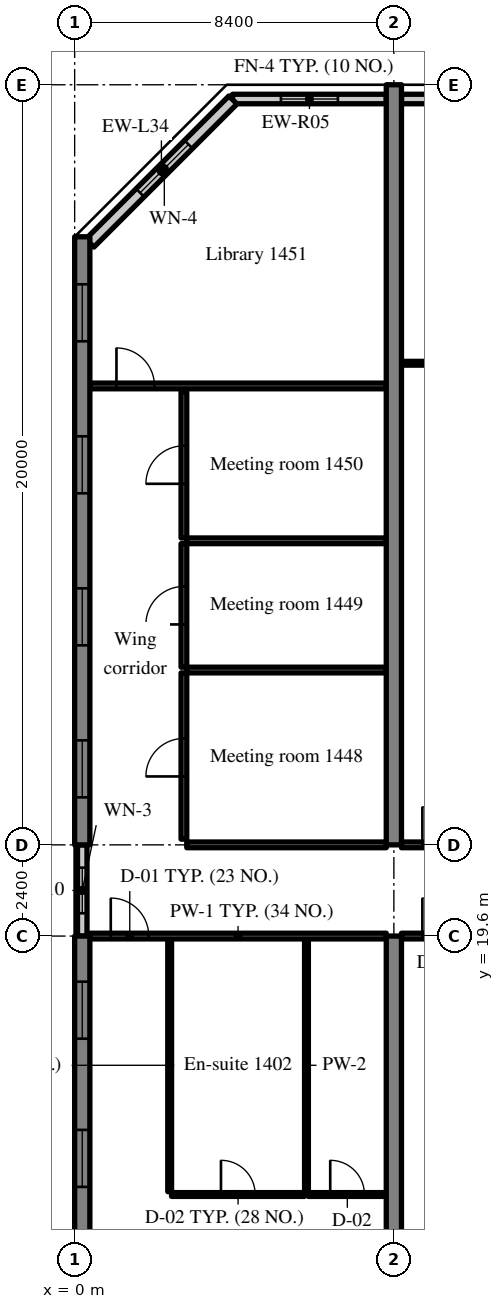
"""IFC4 building model, lengths in metres.
Left out: names, types, materials, properties, quantities, classifications, styles, units other than length and angle.
Written with IfcOpenShell. Run it as: python <this file> out.ifc"""

import sys

from ifc_helpers import new_model, si_unit, direction, frame, frame_2d, origin, place, context, subcontext, project, spatial, rectangle, extrude, source, transform, mapped, element, fill, save


model = new_model("IFC4")
c1 = context("Model", 3, precision=1e-05, world=origin(), true_north=direction((0.0, 1.0)))
c2 = subcontext(c1, "Body", "Model", "MODEL_VIEW")
j1 = project(units=[si_unit("LENGTHUNIT", "METRE"), si_unit("PLANEANGLEUNIT", "RADIAN")], contexts=[c1])
p1 = place(None, origin())
s1 = spatial("IfcSite", under=j1, at=p1, CompositionType="ELEMENT")
p2 = place(p1, origin())
s2 = spatial("IfcBuilding", under=s1, at=p2, CompositionType="ELEMENT")
p3 = place(p2, frame((0.0, 0.0, 62.0)))
s3 = spatial("IfcBuildingStorey", under=s2, at=p3, CompositionType="ELEMENT", Elevation=62.0)
m1 = source(origin(), c2, "Body", "SweptSolid", [
    extrude(rectangle(XDim=15.6, YDim=0.4, at=frame_2d((7.8, 0.0))), origin(), (0.0, 0.0, 1.0), 3.52),
])
p4 = place(p3, frame((0.2, 4.0, 0.0), z_axis=(0.0, 0.0, 1.0), x_axis=(0.0, 1.0, 0.0)))
e1 = element("IfcWall", 1, at=p4, inside=s3, PredefinedType="SHEAR", context=c2, shape_type="MappedRepresentation", body=[
    mapped(m1, transform((0.0, 0.0, 0.0), scale=1.0)),
])
m2 = source(origin(), c2, "Body", "SweptSolid", [
    extrude(rectangle(XDim=1.5, YDim=1.5, at=frame_2d((0.75, 0.75))), frame((0.0, 0.21, 0.0), z_axis=(0.0, -1.0, 0.0), x_axis=(1.0, 0.0, 0.0)), (0.0, 0.0, 1.0), 0.42),
])
p5 = place(p4, frame((1.2, 0.0, 0.9)))
e2 = element("IfcOpeningElement", 2, at=p5, cuts=e1, PredefinedType="OPENING", context=c2, shape_type="MappedRepresentation", body=[
    mapped(m2, transform((0.0, 0.0, 0.0), scale=1.0)),
])
p6 = place(p4, frame((5.1, 0.0, 0.9)))
e3 = element("IfcOpeningElement", 3, at=p6, cuts=e1, PredefinedType="OPENING", context=c2, shape_type="MappedRepresentation", body=[
    mapped(m2, transform((0.0, 0.0, 0.0), scale=1.0)),
])
p7 = place(p4, frame((9.0, 0.0, 0.9)))
e4 = element("IfcOpeningElement", 4, at=p7, cuts=e1, PredefinedType="OPENING", context=c2, shape_type="MappedRepresentation", body=[
    mapped(m2, transform((0.0, 0.0, 0.0), scale=1.0)),
])
p8 = place(p4, frame((12.9, 0.0, 0.9)))
e5 = element("IfcOpeningElement", 5, at=p8, cuts=e1, PredefinedType="OPENING", context=c2, shape_type="MappedRepresentation", body=[
    mapped(m2, transform((0.0, 0.0, 0.0), scale=1.0)),
])
m3 = source(origin(), c2, "Body", "SweptSolid", [
    extrude(rectangle(XDim=16.0, YDim=0.4, at=frame_2d((8.0, 0.0))), origin(), (0.0, 0.0, 1.0), 3.52),
])
p9 = place(p3, frame((0.2, 22.0, 0.0), z_axis=(0.0, 0.0, 1.0), x_axis=(0.0, 1.0, 0.0)))
e6 = element("IfcWall", 6, at=p9, inside=s3, PredefinedType="SHEAR", context=c2, shape_type="MappedRepresentation", body=[
    mapped(m3, transform((0.0, 0.0, 0.0), scale=1.0)),
])
p10 = place(p9, frame((1.25, 0.0, 0.9)))
e7 = element("IfcOpeningElement", 7, at=p10, cuts=e6, PredefinedType="OPENING", context=c2, shape_type="MappedRepresentation", body=[
    mapped(m2, transform((0.0, 0.0, 0.0), scale=1.0)),
])
p11 = place(p9, frame((5.25, 0.0, 0.9)))
e8 = element("IfcOpeningElement", 8, at=p11, cuts=e6, PredefinedType="OPENING", context=c2, shape_type="MappedRepresentation", body=[
    mapped(m2, transform((0.0, 0.0, 0.0), scale=1.0)),
])
p12 = place(p9, frame((9.25, 0.0, 0.9)))
e9 = element("IfcOpeningElement", 9, at=p12, cuts=e6, PredefinedType="OPENING", context=c2, shape_type="MappedRepresentation", body=[
    mapped(m2, transform((0.0, 0.0, 0.0), scale=1.0)),
])
p13 = place(p9, frame((13.25, 0.0, 0.9)))
e10 = element("IfcOpeningElement", 10, at=p13, cuts=e6, PredefinedType="OPENING", context=c2, shape_type="MappedRepresentation", body=[
    mapped(m2, transform((0.0, 0.0, 0.0), scale=1.0)),
])
m4 = source(origin(), c2, "Body", "SweptSolid", [
    extrude(rectangle(XDim=19.6, YDim=0.4, at=frame_2d((9.8, 0.0))), origin(), (0.0, 0.0, 1.0), 3.52),
])
p14 = place(p3, frame((8.4, 0.0, 0.0), z_axis=(0.0, 0.0, 1.0), x_axis=(0.0, 1.0, 0.0)))
e11 = element("IfcWall", 11, at=p14, inside=s3, PredefinedType="SHEAR", context=c2, shape_type="MappedRepresentation", body=[
    mapped(m4, transform((0.0, 0.0, 0.0), scale=1.0)),
])
m5 = source(origin(), c2, "Body", "SweptSolid", [
    extrude(rectangle(XDim=20.0, YDim=0.4, at=frame_2d((10.0, 0.0))), origin(), (0.0, 0.0, 1.0), 3.52),
])
p15 = place(p3, frame((8.4, 22.0, 0.0), z_axis=(0.0, 0.0, 1.0), x_axis=(0.0, 1.0, 0.0)))
e12 = element("IfcWall", 12, at=p15, inside=s3, PredefinedType="SHEAR", context=c2, shape_type="MappedRepresentation", body=[
    mapped(m5, transform((0.0, 0.0, 0.0), scale=1.0)),
])
m6 = source(origin(), c2, "Body", "SweptSolid", [
    extrude(rectangle(XDim=4.045, YDim=0.25, at=frame_2d((2.022, 0.0))), origin(), (0.0, 0.0, 1.0), 2.82),
])
p16 = place(p3, frame((8.2, 41.625, 0.0), z_axis=(0.0, 0.0, 1.0), x_axis=(-1.0, 0.0, 0.0)))
e13 = element("IfcWall", 13, at=p16, inside=s3, PredefinedType="SOLIDWALL", context=c2, shape_type="MappedRepresentation", body=[
    mapped(m6, transform((0.0, 0.0, 0.0), scale=1.0)),
])
m7 = source(origin(), c2, "Body", "SweptSolid", [
    extrude(rectangle(XDim=1.5, YDim=1.5, at=frame_2d((0.75, 0.75))), frame((0.0, 0.135, 0.0), z_axis=(0.0, -1.0, 0.0), x_axis=(1.0, 0.0, 0.0)), (0.0, 0.0, 1.0), 0.27),
])
p17 = place(p16, frame((1.272, 0.0, 0.9)))
e14 = element("IfcOpeningElement", 14, at=p17, cuts=e13, PredefinedType="OPENING", context=c2, shape_type="MappedRepresentation", body=[
    mapped(m7, transform((0.0, 0.0, 0.0), scale=1.0)),
])
m8 = source(origin(), c2, "Body", "SweptSolid", [
    extrude(rectangle(XDim=3.6, YDim=0.25, at=frame_2d((1.8, 0.0))), origin(), (0.0, 0.0, 1.0), 2.82),
])
p18 = place(p3, frame((12.2, 41.625, 0.0), z_axis=(0.0, 0.0, 1.0), x_axis=(-1.0, 0.0, 0.0)))
e15 = element("IfcWall", 15, at=p18, inside=s3, PredefinedType="SOLIDWALL", context=c2, shape_type="MappedRepresentation", body=[
    mapped(m8, transform((0.0, 0.0, 0.0), scale=1.0)),
])
p19 = place(p18, frame((1.05, 0.0, 0.9)))
e16 = element("IfcOpeningElement", 16, at=p19, cuts=e15, PredefinedType="OPENING", context=c2, shape_type="MappedRepresentation", body=[
    mapped(m7, transform((0.0, 0.0, 0.0), scale=1.0)),
])
m9 = source(origin(), c2, "Body", "SweptSolid", [
    extrude(rectangle(XDim=5.326, YDim=0.3, at=frame_2d((2.663, 0.0))), origin(), (0.0, 0.0, 1.0), 3.52),
])
p20 = place(p3, frame((4.166, 41.6, 0.0), z_axis=(0.0, 0.0, 1.0), x_axis=(-0.707106781187, -0.707106781187, 0.0)))
e17 = element("IfcWall", 17, at=p20, inside=s3, PredefinedType="SOLIDWALL", context=c2, shape_type="MappedRepresentation", body=[
    mapped(m9, transform((0.0, 0.0, 0.0), scale=1.0)),
])
m10 = source(origin(), c2, "Body", "SweptSolid", [
    extrude(rectangle(XDim=1.8, YDim=1.5, at=frame_2d((0.9, 0.75))), frame((0.0, 0.16, 0.0), z_axis=(0.0, -1.0, 0.0), x_axis=(1.0, 0.0, 0.0)), (0.0, 0.0, 1.0), 0.32),
])
p21 = place(p20, frame((1.654, 0.0, 0.9)))
e18 = element("IfcOpeningElement", 18, at=p21, cuts=e17, PredefinedType="OPENING", context=c2, shape_type="MappedRepresentation", body=[
    mapped(m10, transform((0.0, 0.0, 0.0), scale=1.0)),
])
m11 = source(origin(), c2, "Body", "SweptSolid", [
    extrude(rectangle(XDim=2.4, YDim=0.25, at=frame_2d((1.2, 0.0))), origin(), (0.0, 0.0, 1.0), 2.62),
])
p22 = place(p3, frame((0.2, 19.6, 0.0), z_axis=(0.0, 0.0, 1.0), x_axis=(0.0, 1.0, 0.0)))
e19 = element("IfcWall", 19, at=p22, inside=s3, PredefinedType="SOLIDWALL", context=c2, shape_type="MappedRepresentation", body=[
    mapped(m11, transform((0.0, 0.0, 0.0), scale=1.0)),
])
m12 = source(origin(), c2, "Body", "SweptSolid", [
    extrude(rectangle(XDim=1.2, YDim=1.5, at=frame_2d((0.6, 0.75))), frame((0.0, 0.135, 0.0), z_axis=(0.0, -1.0, 0.0), x_axis=(1.0, 0.0, 0.0)), (0.0, 0.0, 1.0), 0.27),
])
p23 = place(p22, frame((0.6, 0.0, 0.9)))
e20 = element("IfcOpeningElement", 20, at=p23, cuts=e19, PredefinedType="OPENING", context=c2, shape_type="MappedRepresentation", body=[
    mapped(m12, transform((0.0, 0.0, 0.0), scale=1.0)),
])
m13 = source(origin(), c2, "Body", "SweptSolid", [
    extrude(rectangle(XDim=6.65, YDim=0.1, at=frame_2d((3.325, 0.0))), origin(), (0.0, 0.0, 1.0), 3.52),
])
for number, where, z_axis, x_axis in (
    (21, (2.5, 12.875, 0.0), (0.0, 0.0, 1.0), (0.0, 1.0, 0.0)),
    (22, (6.1, 12.875, 0.0), (0.0, 0.0, 1.0), (0.0, 1.0, 0.0)),
):
    element("IfcWall", number, at=place(p3, frame(where, z_axis=z_axis, x_axis=x_axis)), inside=s3, PredefinedType="PARTITIONING", context=c2, shape_type="MappedRepresentation", body=[
        mapped(m13, transform((0.0, 0.0, 0.0), scale=1.0)),
    ])
m14 = source(origin(), c2, "Body", "SweptSolid", [
    extrude(rectangle(XDim=3.5, YDim=0.1, at=frame_2d((1.75, 0.0))), origin(), (0.0, 0.0, 1.0), 3.52),
])
p24 = place(p3, frame((2.55, 12.8, 0.0), z_axis=(0.0, 0.0, 1.0), x_axis=(1.0, 0.0, 0.0)))
e23 = element("IfcWall", 23, at=p24, inside=s3, PredefinedType="PARTITIONING", context=c2, shape_type="MappedRepresentation", body=[
    mapped(m14, transform((0.0, 0.0, 0.0), scale=1.0)),
])
m15 = source(origin(), c2, "Body", "SweptSolid", [
    extrude(rectangle(XDim=0.9, YDim=2.1, at=frame_2d((0.45, 1.05))), frame((0.0, 0.06, 0.0), z_axis=(0.0, -1.0, 0.0), x_axis=(1.0, 0.0, 0.0)), (0.0, 0.0, 1.0), 0.12),
])
p25 = place(p24, frame((1.3, 0.0, 0.0)))
e24 = element("IfcOpeningElement", 24, at=p25, cuts=e23, PredefinedType="OPENING", context=c2, shape_type="MappedRepresentation", body=[
    mapped(m15, transform((0.0, 0.0, 0.0), scale=1.0)),
])
m16 = source(origin(), c2, "Body", "SweptSolid", [
    extrude(rectangle(XDim=2.05, YDim=0.1, at=frame_2d((1.025, 0.0))), origin(), (0.0, 0.0, 1.0), 3.52),
])
p26 = place(p3, frame((6.15, 12.8, 0.0), z_axis=(0.0, 0.0, 1.0), x_axis=(1.0, 0.0, 0.0)))
e25 = element("IfcWall", 25, at=p26, inside=s3, PredefinedType="PARTITIONING", context=c2, shape_type="MappedRepresentation", body=[
    mapped(m16, transform((0.0, 0.0, 0.0), scale=1.0)),
])
p27 = place(p26, frame((0.575, 0.0, 0.0)))
e26 = element("IfcOpeningElement", 26, at=p27, cuts=e25, PredefinedType="OPENING", context=c2, shape_type="MappedRepresentation", body=[
    mapped(m15, transform((0.0, 0.0, 0.0), scale=1.0)),
])
m17 = source(origin(), c2, "Body", "SweptSolid", [
    extrude(rectangle(XDim=7.8, YDim=0.15, at=frame_2d((3.9, 0.0))), origin(), (0.0, 0.0, 1.0), 2.82),
])
p28 = place(p3, frame((0.4, 19.6, 0.0), z_axis=(0.0, 0.0, 1.0), x_axis=(1.0, 0.0, 0.0)))
e27 = element("IfcWall", 27, at=p28, inside=s3, PredefinedType="PARTITIONING", context=c2, shape_type="MappedRepresentation", body=[
    mapped(m17, transform((0.0, 0.0, 0.0), scale=1.0)),
])
m18 = source(origin(), c2, "Body", "SweptSolid", [
    extrude(rectangle(XDim=1.0, YDim=2.1, at=frame_2d((0.5, 1.05))), frame((0.0, 0.085, 0.0), z_axis=(0.0, -1.0, 0.0), x_axis=(1.0, 0.0, 0.0)), (0.0, 0.0, 1.0), 0.17),
])
p29 = place(p28, frame((0.55, 0.0, 0.0)))
e28 = element("IfcOpeningElement", 28, at=p29, cuts=e27, PredefinedType="OPENING", context=c2, shape_type="MappedRepresentation", body=[
    mapped(m18, transform((0.0, 0.0, 0.0), scale=1.0)),
])
m19 = source(origin(), c2, "Body", "SweptSolid", [
    extrude(rectangle(XDim=8.0, YDim=0.15, at=frame_2d((4.0, 0.0))), origin(), (0.0, 0.0, 1.0), 2.82),
])
p30 = place(p3, frame((8.6, 19.6, 0.0), z_axis=(0.0, 0.0, 1.0), x_axis=(1.0, 0.0, 0.0)))
e29 = element("IfcWall", 29, at=p30, inside=s3, PredefinedType="PARTITIONING", context=c2, shape_type="MappedRepresentation", body=[
    mapped(m19, transform((0.0, 0.0, 0.0), scale=1.0)),
])
p31 = place(p30, frame((0.55, 0.0, 0.0)))
e30 = element("IfcOpeningElement", 30, at=p31, cuts=e29, PredefinedType="OPENING", context=c2, shape_type="MappedRepresentation", body=[
    mapped(m18, transform((0.0, 0.0, 0.0), scale=1.0)),
])
m20 = source(origin(), c2, "Body", "SweptSolid", [
    extrude(rectangle(XDim=5.25, YDim=0.15, at=frame_2d((2.625, 0.0))), origin(), (0.0, 0.0, 1.0), 2.82),
])
p32 = place(p3, frame((2.95, 22.0, 0.0), z_axis=(0.0, 0.0, 1.0), x_axis=(1.0, 0.0, 0.0)))
e31 = element("IfcWall", 31, at=p32, inside=s3, PredefinedType="PARTITIONING", context=c2, shape_type="MappedRepresentation", body=[
    mapped(m20, transform((0.0, 0.0, 0.0), scale=1.0)),
])
m21 = source(origin(), c2, "Body", "SweptSolid", [
    extrude(rectangle(XDim=4.375, YDim=0.15, at=frame_2d((2.188, 0.0))), origin(), (0.0, 0.0, 1.0), 3.52),
])
p33 = place(p3, frame((2.875, 22.15, 0.0), z_axis=(0.0, 0.0, 1.0), x_axis=(0.0, 1.0, 0.0)))
e32 = element("IfcWall", 32, at=p33, inside=s3, PredefinedType="PARTITIONING", context=c2, shape_type="MappedRepresentation", body=[
    mapped(m21, transform((0.0, 0.0, 0.0), scale=1.0)),
])
p34 = place(p33, frame((1.65, 0.0, 0.0)))
e33 = element("IfcOpeningElement", 33, at=p34, cuts=e32, PredefinedType="OPENING", context=c2, shape_type="MappedRepresentation", body=[
    mapped(m18, transform((0.0, 0.0, 0.0), scale=1.0)),
])
m22 = source(origin(), c2, "Body", "SweptSolid", [
    extrude(rectangle(XDim=5.25, YDim=0.15, at=frame_2d((2.625, 0.0))), origin(), (0.0, 0.0, 1.0), 3.52),
])
p35 = place(p3, frame((2.95, 26.6, 0.0), z_axis=(0.0, 0.0, 1.0), x_axis=(1.0, 0.0, 0.0)))
e34 = element("IfcWall", 34, at=p35, inside=s3, PredefinedType="PARTITIONING", context=c2, shape_type="MappedRepresentation", body=[
    mapped(m22, transform((0.0, 0.0, 0.0), scale=1.0)),
])
m23 = source(origin(), c2, "Body", "SweptSolid", [
    extrude(rectangle(XDim=3.25, YDim=0.15, at=frame_2d((1.625, 0.0))), origin(), (0.0, 0.0, 1.0), 3.52),
])
p36 = place(p3, frame((2.875, 26.675, 0.0), z_axis=(0.0, 0.0, 1.0), x_axis=(0.0, 1.0, 0.0)))
e35 = element("IfcWall", 35, at=p36, inside=s3, PredefinedType="PARTITIONING", context=c2, shape_type="MappedRepresentation", body=[
    mapped(m23, transform((0.0, 0.0, 0.0), scale=1.0)),
])
p37 = place(p36, frame((1.125, 0.0, 0.0)))
e36 = element("IfcOpeningElement", 36, at=p37, cuts=e35, PredefinedType="OPENING", context=c2, shape_type="MappedRepresentation", body=[
    mapped(m18, transform((0.0, 0.0, 0.0), scale=1.0)),
])
p38 = place(p3, frame((2.95, 30.0, 0.0), z_axis=(0.0, 0.0, 1.0), x_axis=(1.0, 0.0, 0.0)))
e37 = element("IfcWall", 37, at=p38, inside=s3, PredefinedType="PARTITIONING", context=c2, shape_type="MappedRepresentation", body=[
    mapped(m22, transform((0.0, 0.0, 0.0), scale=1.0)),
])
m24 = source(origin(), c2, "Body", "SweptSolid", [
    extrude(rectangle(XDim=3.85, YDim=0.15, at=frame_2d((1.925, 0.0))), origin(), (0.0, 0.0, 1.0), 3.52),
])
p39 = place(p3, frame((2.875, 30.075, 0.0), z_axis=(0.0, 0.0, 1.0), x_axis=(0.0, 1.0, 0.0)))
e38 = element("IfcWall", 38, at=p39, inside=s3, PredefinedType="PARTITIONING", context=c2, shape_type="MappedRepresentation", body=[
    mapped(m24, transform((0.0, 0.0, 0.0), scale=1.0)),
])
p40 = place(p39, frame((1.425, 0.0, 0.0)))
e39 = element("IfcOpeningElement", 39, at=p40, cuts=e38, PredefinedType="OPENING", context=c2, shape_type="MappedRepresentation", body=[
    mapped(m18, transform((0.0, 0.0, 0.0), scale=1.0)),
])
m25 = source(origin(), c2, "Body", "SweptSolid", [
    extrude(rectangle(XDim=7.8, YDim=0.15, at=frame_2d((3.9, 0.0))), origin(), (0.0, 0.0, 1.0), 3.52),
])
p41 = place(p3, frame((0.4, 34.075, 0.0), z_axis=(0.0, 0.0, 1.0), x_axis=(1.0, 0.0, 0.0)))
e40 = element("IfcWall", 40, at=p41, inside=s3, PredefinedType="PARTITIONING", context=c2, shape_type="MappedRepresentation", body=[
    mapped(m25, transform((0.0, 0.0, 0.0), scale=1.0)),
])
p42 = place(p41, frame((0.7, 0.0, 0.0)))
e41 = element("IfcOpeningElement", 41, at=p42, cuts=e40, PredefinedType="OPENING", context=c2, shape_type="MappedRepresentation", body=[
    mapped(m18, transform((0.0, 0.0, 0.0), scale=1.0)),
])
m26 = source(origin(), c2, "Body", "SweptSolid", [
    extrude(rectangle(XDim=8.0, YDim=0.1, at=frame_2d((4.0, 0.0))), origin(), (0.0, 0.0, 1.0), 3.52),
])
p43 = place(p3, frame((8.6, 34.672, 0.0), z_axis=(0.0, 0.0, 1.0), x_axis=(1.0, 0.0, 0.0)))
e42 = element("IfcWall", 42, at=p43, inside=s3, PredefinedType="PARTITIONING", context=c2, shape_type="MappedRepresentation", body=[
    mapped(m26, transform((0.0, 0.0, 0.0), scale=1.0)),
])
m27 = source(origin(), c2, "Body", "SweptSolid", [
    extrude(rectangle(XDim=1.8, YDim=2.1, at=frame_2d((0.9, 1.05))), frame((0.0, 0.06, 0.0), z_axis=(0.0, -1.0, 0.0), x_axis=(1.0, 0.0, 0.0)), (0.0, 0.0, 1.0), 0.12),
])
p44 = place(p43, frame((3.1, 0.0, 0.0)))
e43 = element("IfcOpeningElement", 43, at=p44, cuts=e42, PredefinedType="OPENING", context=c2, shape_type="MappedRepresentation", body=[
    mapped(m27, transform((0.0, 0.0, 0.0), scale=1.0)),
])
p45 = place(p3, frame((8.6, 22.0, 0.0), z_axis=(0.0, 0.0, 1.0), x_axis=(1.0, 0.0, 0.0)))
e44 = element("IfcWall", 44, at=p45, inside=s3, PredefinedType="PARTITIONING", context=c2, shape_type="MappedRepresentation", body=[
    mapped(m19, transform((0.0, 0.0, 0.0), scale=1.0)),
])
p46 = place(p45, frame((0.55, 0.0, 0.0)))
e45 = element("IfcOpeningElement", 45, at=p46, cuts=e44, PredefinedType="OPENING", context=c2, shape_type="MappedRepresentation", body=[
    mapped(m18, transform((0.0, 0.0, 0.0), scale=1.0)),
])
m28 = source(origin(), c2, "Body", "SweptSolid", [
    extrude(rectangle(XDim=1.5, YDim=1.5, at=frame_2d((0.75, 0.75))), frame((0.0, 0.03, 0.0), z_axis=(0.0, -1.0, 0.0), x_axis=(1.0, 0.0, 0.0)), (0.0, 0.0, 1.0), 0.06),
])
p47 = place(p17, origin())
e46 = element("IfcWindow", 46, at=p47, inside=s3, PartitioningType="SINGLE_PANEL", PredefinedType="WINDOW", context=c2, shape_type="MappedRepresentation", body=[
    mapped(m28, transform((0.0, 0.0, 0.0), scale=1.0)),
])
fill(e14, e46)
m29 = source(origin(), c2, "Body", "SweptSolid", [
    extrude(rectangle(XDim=1.8, YDim=1.5, at=frame_2d((0.9, 0.75))), frame((0.0, 0.03, 0.0), z_axis=(0.0, -1.0, 0.0), x_axis=(1.0, 0.0, 0.0)), (0.0, 0.0, 1.0), 0.06),
])
p48 = place(p21, origin())
e47 = element("IfcWindow", 47, at=p48, inside=s3, PartitioningType="SINGLE_PANEL", PredefinedType="WINDOW", context=c2, shape_type="MappedRepresentation", body=[
    mapped(m29, transform((0.0, 0.0, 0.0), scale=1.0)),
])
fill(e18, e47)
p49 = place(p7, origin())
e48 = element("IfcWindow", 48, at=p49, inside=s3, PartitioningType="SINGLE_PANEL", PredefinedType="WINDOW", context=c2, shape_type="MappedRepresentation", body=[
    mapped(m28, transform((0.0, 0.0, 0.0), scale=1.0)),
])
fill(e4, e48)
p50 = place(p8, origin())
e49 = element("IfcWindow", 49, at=p50, inside=s3, PartitioningType="SINGLE_PANEL", PredefinedType="WINDOW", context=c2, shape_type="MappedRepresentation", body=[
    mapped(m28, transform((0.0, 0.0, 0.0), scale=1.0)),
])
fill(e5, e49)
p51 = place(p10, origin())
e50 = element("IfcWindow", 50, at=p51, inside=s3, PartitioningType="SINGLE_PANEL", PredefinedType="WINDOW", context=c2, shape_type="MappedRepresentation", body=[
    mapped(m28, transform((0.0, 0.0, 0.0), scale=1.0)),
])
fill(e7, e50)
p52 = place(p11, origin())
e51 = element("IfcWindow", 51, at=p52, inside=s3, PartitioningType="SINGLE_PANEL", PredefinedType="WINDOW", context=c2, shape_type="MappedRepresentation", body=[
    mapped(m28, transform((0.0, 0.0, 0.0), scale=1.0)),
])
fill(e8, e51)
p53 = place(p12, origin())
e52 = element("IfcWindow", 52, at=p53, inside=s3, PartitioningType="SINGLE_PANEL", PredefinedType="WINDOW", context=c2, shape_type="MappedRepresentation", body=[
    mapped(m28, transform((0.0, 0.0, 0.0), scale=1.0)),
])
fill(e9, e52)
p54 = place(p13, origin())
e53 = element("IfcWindow", 53, at=p54, inside=s3, PartitioningType="SINGLE_PANEL", PredefinedType="WINDOW", context=c2, shape_type="MappedRepresentation", body=[
    mapped(m28, transform((0.0, 0.0, 0.0), scale=1.0)),
])
fill(e10, e53)
m30 = source(origin(), c2, "Body", "SweptSolid", [
    extrude(rectangle(XDim=1.2, YDim=1.5, at=frame_2d((0.6, 0.75))), frame((0.0, 0.03, 0.0), z_axis=(0.0, -1.0, 0.0), x_axis=(1.0, 0.0, 0.0)), (0.0, 0.0, 1.0), 0.06),
])
p55 = place(p23, origin())
e54 = element("IfcWindow", 54, at=p55, inside=s3, PartitioningType="SINGLE_PANEL", PredefinedType="WINDOW", context=c2, shape_type="MappedRepresentation", body=[
    mapped(m30, transform((0.0, 0.0, 0.0), scale=1.0)),
])
fill(e20, e54)
m31 = source(origin(), c2, "Body", "SweptSolid", [
    extrude(rectangle(XDim=0.9, YDim=2.1, at=frame_2d((0.45, 1.05))), frame((0.0, 0.025, 0.0), z_axis=(0.0, -1.0, 0.0), x_axis=(1.0, 0.0, 0.0)), (0.0, 0.0, 1.0), 0.05),
])
p56 = place(p25, origin())
e55 = element("IfcDoor", 55, at=p56, inside=s3, OperationType="SINGLE_SWING_LEFT", PredefinedType="DOOR", context=c2, shape_type="MappedRepresentation", body=[
    mapped(m31, transform((0.0, 0.0, 0.0), scale=1.0)),
])
fill(e24, e55)
p57 = place(p27, origin())
e56 = element("IfcDoor", 56, at=p57, inside=s3, OperationType="SINGLE_SWING_LEFT", PredefinedType="DOOR", context=c2, shape_type="MappedRepresentation", body=[
    mapped(m31, transform((0.0, 0.0, 0.0), scale=1.0)),
])
fill(e26, e56)
m32 = source(origin(), c2, "Body", "SweptSolid", [
    extrude(rectangle(XDim=1.0, YDim=2.1, at=frame_2d((0.5, 1.05))), frame((0.0, 0.025, 0.0), z_axis=(0.0, -1.0, 0.0), x_axis=(1.0, 0.0, 0.0)), (0.0, 0.0, 1.0), 0.05),
])
p58 = place(p29, origin())
e57 = element("IfcDoor", 57, at=p58, inside=s3, OperationType="SINGLE_SWING_LEFT", PredefinedType="DOOR", context=c2, shape_type="MappedRepresentation", body=[
    mapped(m32, transform((0.0, 0.0, 0.0), scale=1.0)),
])
fill(e28, e57)
p59 = place(p31, origin())
e58 = element("IfcDoor", 58, at=p59, inside=s3, OperationType="SINGLE_SWING_LEFT", PredefinedType="DOOR", context=c2, shape_type="MappedRepresentation", body=[
    mapped(m32, transform((0.0, 0.0, 0.0), scale=1.0)),
])
fill(e30, e58)
p60 = place(p34, origin())
e59 = element("IfcDoor", 59, at=p60, inside=s3, OperationType="SINGLE_SWING_LEFT", PredefinedType="DOOR", context=c2, shape_type="MappedRepresentation", body=[
    mapped(m32, transform((0.0, 0.0, 0.0), scale=1.0)),
])
fill(e33, e59)
p61 = place(p37, origin())
e60 = element("IfcDoor", 60, at=p61, inside=s3, OperationType="SINGLE_SWING_LEFT", PredefinedType="DOOR", context=c2, shape_type="MappedRepresentation", body=[
    mapped(m32, transform((0.0, 0.0, 0.0), scale=1.0)),
])
fill(e36, e60)
p62 = place(p40, origin())
e61 = element("IfcDoor", 61, at=p62, inside=s3, OperationType="SINGLE_SWING_LEFT", PredefinedType="DOOR", context=c2, shape_type="MappedRepresentation", body=[
    mapped(m32, transform((0.0, 0.0, 0.0), scale=1.0)),
])
fill(e39, e61)
p63 = place(p42, origin())
e62 = element("IfcDoor", 62, at=p63, inside=s3, OperationType="SINGLE_SWING_LEFT", PredefinedType="DOOR", context=c2, shape_type="MappedRepresentation", body=[
    mapped(m32, transform((0.0, 0.0, 0.0), scale=1.0)),
])
fill(e41, e62)
p64 = place(p46, origin())
e63 = element("IfcDoor", 63, at=p64, inside=s3, OperationType="SINGLE_SWING_LEFT", PredefinedType="DOOR", context=c2, shape_type="MappedRepresentation", body=[
    mapped(m32, transform((0.0, 0.0, 0.0), scale=1.0)),
])
fill(e45, e63)
save(model, sys.argv[1])
